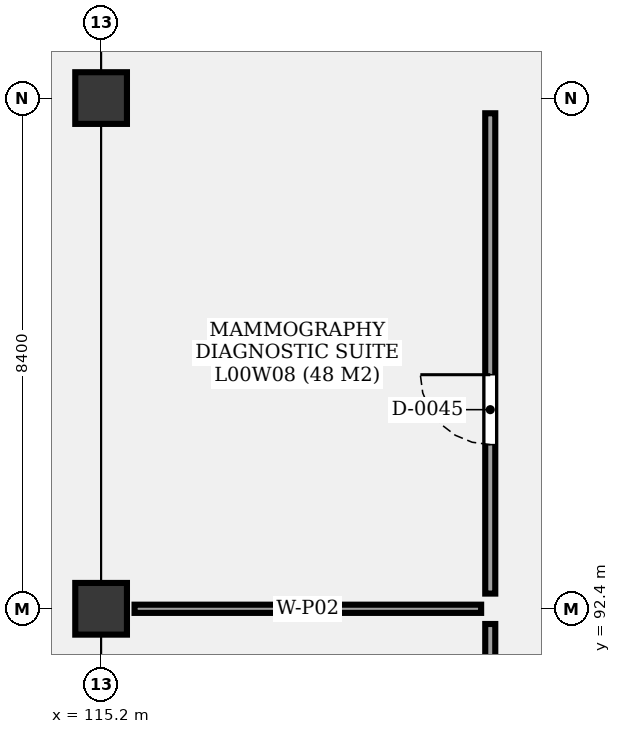
"""IFC4 building model, lengths in metres.
Left out: names, types, materials, properties, quantities, classifications, styles, units other than length and angle.
Written with IfcOpenShell. Run it as: python <this file> out.ifc"""

import sys

from ifc_helpers import new_model, si_unit, direction, frame, frame_2d, origin, origin_2d, place, context, subcontext, project, spatial, rectangle, extrude, element, fill, save


model = new_model("IFC4")
c1 = context("Model", 3, precision=1e-05, world=origin(), true_north=direction((0.0, 1.0)))
c2 = subcontext(c1, "Body", "Model", "MODEL_VIEW")
j1 = project(units=[si_unit("LENGTHUNIT", "METRE"), si_unit("PLANEANGLEUNIT", "RADIAN")], contexts=[c1])
p1 = place(None, origin())
s1 = spatial("IfcSite", under=j1, at=p1, CompositionType="ELEMENT")
p2 = place(p1, origin())
s2 = spatial("IfcBuilding", under=s1, at=p2, CompositionType="ELEMENT")
p3 = place(p2, origin())
s3 = spatial("IfcBuildingStorey", under=s2, at=p3, CompositionType="ELEMENT", Elevation=0.0)
for number, where, z_axis, x_axis in (
    (1, (115.2, 92.4, -0.35), (0.0, 0.0, 1.0), (1.0, 0.0, 0.0)),
    (2, (115.2, 100.8, -0.35), (0.0, 0.0, 1.0), (1.0, 0.0, 0.0)),
):
    element("IfcColumn", number, at=place(p3, frame(where, z_axis=z_axis, x_axis=x_axis)), inside=s3, PredefinedType="COLUMN", context=c2, shape_type="SweptSolid", body=[
        extrude(rectangle(XDim=0.85, YDim=0.85, at=origin_2d()), origin(), (0.0, 0.0, 1.0), 5.45),
    ])
p4 = place(p3, frame((121.6, 84.25, 0.0), z_axis=(0.0, 0.0, 1.0), x_axis=(0.0, 1.0, 0.0)))
e3 = element("IfcWall", 3, at=p4, inside=s3, PredefinedType="PARTITIONING", context=c2, shape_type="SweptSolid", body=[
    extrude(rectangle(XDim=7.9, YDim=0.165, at=frame_2d((3.95, 0.0))), origin(), (0.0, 0.0, 1.0), 3.98),
])
p5 = place(p4, frame((2.45, 0.0, 0.0)))
e4 = element("IfcOpeningElement", 4, at=p5, cuts=e3, PredefinedType="OPENING", context=c2, shape_type="SweptSolid", body=[
    extrude(rectangle(XDim=1.15, YDim=2.2, at=frame_2d((0.575, 1.1))), frame((0.0, 0.093, 0.0), z_axis=(0.0, -1.0, 0.0), x_axis=(1.0, 0.0, 0.0)), (0.0, 0.0, 1.0), 0.185),
])
p6 = place(p3, frame((121.6, 92.65, 0.0), z_axis=(0.0, 0.0, 1.0), x_axis=(0.0, 1.0, 0.0)))
e5 = element("IfcWall", 5, at=p6, inside=s3, PredefinedType="PARTITIONING", context=c2, shape_type="SweptSolid", body=[
    extrude(rectangle(XDim=7.9, YDim=0.165, at=frame_2d((3.95, 0.0))), origin(), (0.0, 0.0, 1.0), 3.98),
])
p7 = place(p6, frame((2.45, 0.0, 0.0)))
e6 = element("IfcOpeningElement", 6, at=p7, cuts=e5, PredefinedType="OPENING", context=c2, shape_type="SweptSolid", body=[
    extrude(rectangle(XDim=1.15, YDim=2.2, at=frame_2d((0.575, 1.1))), frame((0.0, 0.093, 0.0), z_axis=(0.0, -1.0, 0.0), x_axis=(1.0, 0.0, 0.0)), (0.0, 0.0, 1.0), 0.185),
])
p8 = place(p3, frame((115.75, 92.4, 0.0), z_axis=(0.0, 0.0, 1.0), x_axis=(1.0, 0.0, 0.0)))
e7 = element("IfcWall", 7, at=p8, inside=s3, PredefinedType="PARTITIONING", context=c2, shape_type="SweptSolid", body=[
    extrude(rectangle(XDim=5.7, YDim=0.135, at=frame_2d((2.85, 0.0))), origin(), (0.0, 0.0, 1.0), 3.98),
])
p9 = place(p7, origin())
e8 = element("IfcDoor", 8, at=p9, inside=s3, OperationType="SINGLE_SWING_RIGHT", PredefinedType="DOOR", context=c2, shape_type="SweptSolid", body=[
    extrude(rectangle(XDim=1.15, YDim=2.2, at=frame_2d((0.575, 1.1))), frame((0.0, 0.025, 0.0), z_axis=(0.0, -1.0, 0.0), x_axis=(1.0, 0.0, 0.0)), (0.0, 0.0, 1.0), 0.05),
])
fill(e6, e8)
save(model, sys.argv[1])
